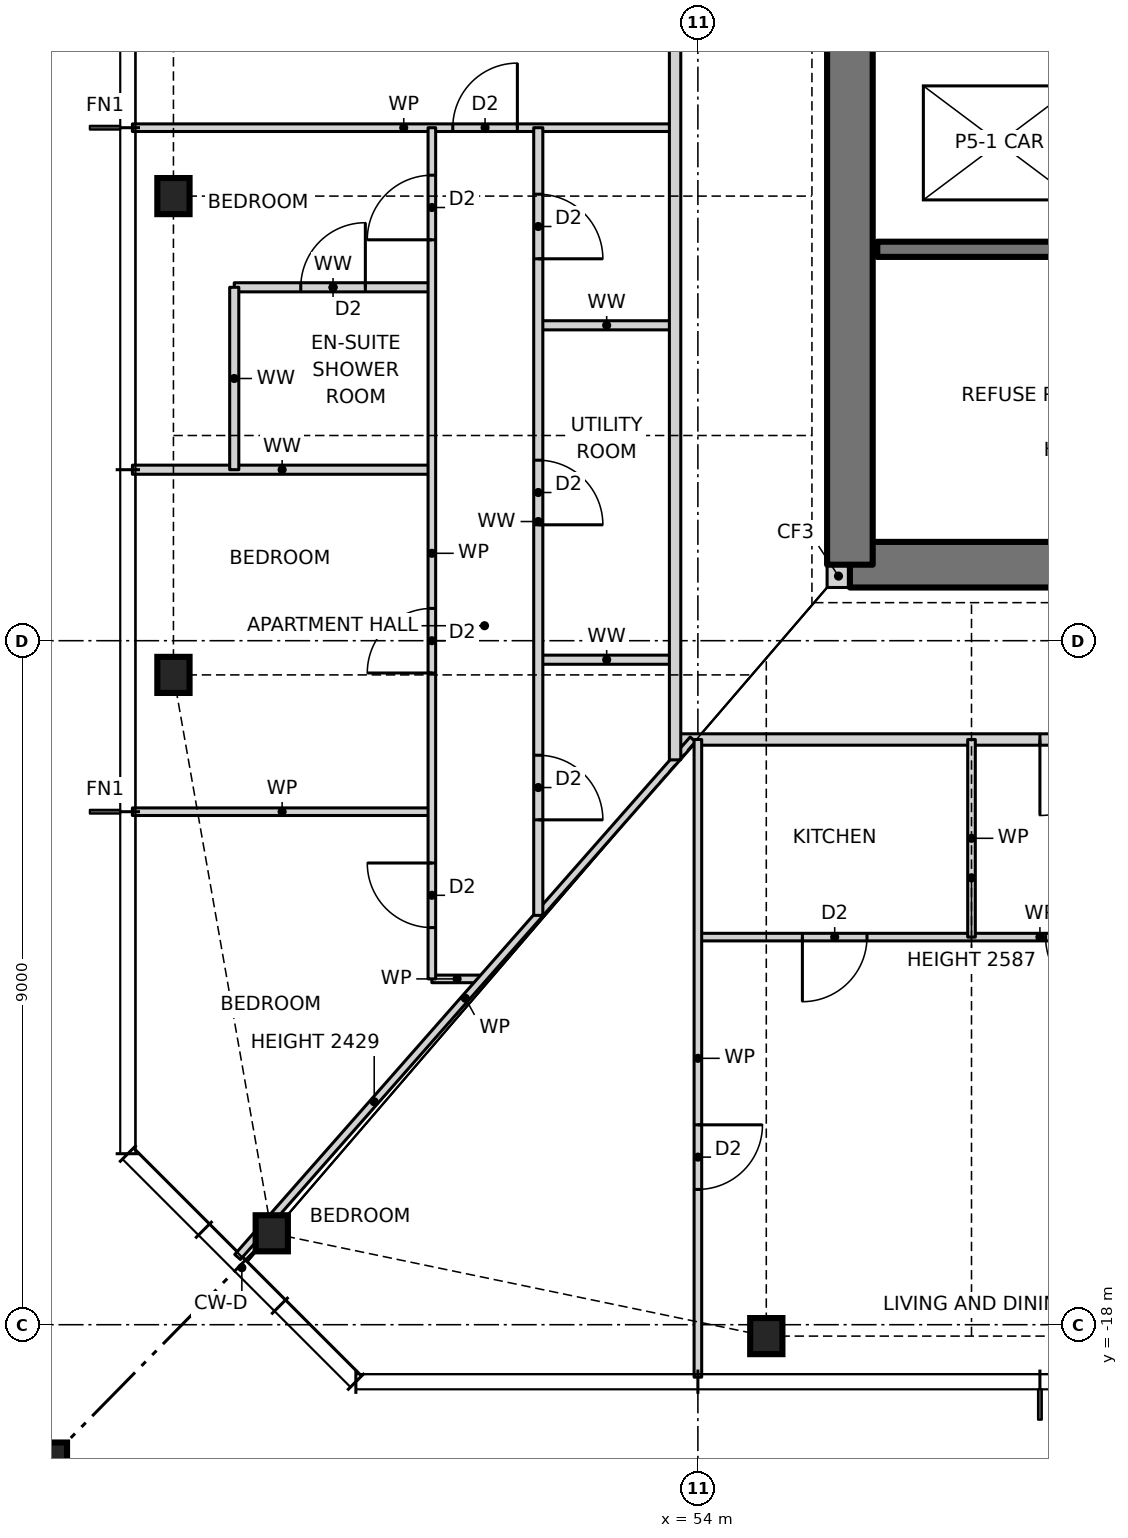
"""IFC4 building model, lengths in metres.
Left out: names, types, materials, properties, quantities, classifications, styles, units other than length and angle.
Written with IfcOpenShell. Run it as: python <this file> out.ifc"""

import sys

from ifc_helpers import new_model, si_unit, direction, frame, frame_2d, origin, origin_2d, place, context, subcontext, project, spatial, rectangle, hollow_rectangle, i_section, extrude, element, fill, save


model = new_model("IFC4")
c1 = context("Model", 3, precision=1e-05, world=origin(), true_north=direction((0.0, 1.0)))
c2 = subcontext(c1, "Body", "Model", "MODEL_VIEW")
j1 = project(units=[si_unit("LENGTHUNIT", "METRE"), si_unit("PLANEANGLEUNIT", "RADIAN")], contexts=[c1])
p1 = place(None, origin())
s1 = spatial("IfcSite", under=j1, at=p1, CompositionType="ELEMENT")
p2 = place(p1, origin())
s2 = spatial("IfcBuilding", under=s1, at=p2, CompositionType="ELEMENT")
p3 = place(p2, frame((0.0, 0.0, 67.5)))
s3 = spatial("IfcBuildingStorey", under=s2, at=p3, CompositionType="ELEMENT", Elevation=67.5)
for number, where, z_axis, x_axis in (
    (1, (48.394, -16.797, 0.0), (0.0, 0.0, 1.0), (1.0, 0.0, 0.0)),
    (2, (54.9, -18.15, 0.0), (0.0, 0.0, 1.0), (1.0, 0.0, 0.0)),
    (3, (47.1, -3.15, 0.0), (0.0, 0.0, 1.0), (1.0, 0.0, 0.0)),
    (4, (47.1, -9.45, 0.0), (0.0, 0.0, 1.0), (1.0, 0.0, 0.0)),
):
    element("IfcColumn", number, at=place(p3, frame(where, z_axis=z_axis, x_axis=x_axis)), inside=s3, PredefinedType="COLUMN", context=c2, shape_type="SweptSolid", body=[
        extrude(i_section(OverallWidth=0.424, OverallDepth=0.475, WebThickness=0.048, FlangeThickness=0.077, at=origin_2d()), origin(), (0.0, 0.0, 1.0), 3.5),
    ])
p4 = place(p3, frame((45.1, -20.15, 0.0), z_axis=(0.0, 0.0, 1.0), x_axis=(1.0, 0.0, 0.0)))
e5 = element("IfcColumn", 5, at=p4, inside=s3, PredefinedType="COLUMN", context=c2, shape_type="SweptSolid", body=[
    extrude(hollow_rectangle(XDim=1.2, YDim=1.2, WallThickness=0.07, at=origin_2d()), origin(), (0.0, 0.0, 1.0), 3.5),
])
p5 = place(p3, frame((55.7, -8.15, 0.0), z_axis=(0.0, 0.0, 1.0), x_axis=(1.0, 0.0, 0.0)))
e6 = element("IfcWall", 6, at=p5, inside=s3, PredefinedType="SOLIDWALL", context=c2, shape_type="SweptSolid", body=[
    extrude(rectangle(XDim=0.3, YDim=0.3, at=frame_2d((0.15, 0.0))), origin(), (0.0, 0.0, 1.0), 3.5),
])
p6 = place(p3, frame((56.0, -8.0, 0.0), z_axis=(0.0, 0.0, 1.0), x_axis=(1.0, 0.0, 0.0)))
e7 = element("IfcWall", 7, at=p6, inside=s3, PredefinedType="SHEAR", context=c2, shape_type="SweptSolid", body=[
    extrude(rectangle(XDim=14.0, YDim=0.6, at=frame_2d((7.0, 0.0))), origin(), (0.0, 0.0, 1.0), 3.5),
])
p7 = place(p6, frame((2.7, 0.0, 0.0)))
e8 = element("IfcOpeningElement", 8, at=p7, cuts=e7, PredefinedType="OPENING", context=c2, shape_type="SweptSolid", body=[
    extrude(rectangle(XDim=0.9, YDim=2.1, at=frame_2d((0.45, 1.05))), frame((0.0, 0.31, 0.0), z_axis=(0.0, -1.0, 0.0), x_axis=(1.0, 0.0, 0.0)), (0.0, 0.0, 1.0), 0.62),
])
p8 = place(p6, frame((7.7, 0.0, 0.0)))
e9 = element("IfcOpeningElement", 9, at=p8, cuts=e7, PredefinedType="OPENING", context=c2, shape_type="SweptSolid", body=[
    extrude(rectangle(XDim=0.9, YDim=2.1, at=frame_2d((0.45, 1.05))), frame((0.0, 0.31, 0.0), z_axis=(0.0, -1.0, 0.0), x_axis=(1.0, 0.0, 0.0)), (0.0, 0.0, 1.0), 0.62),
])
p9 = place(p3, frame((56.0, 8.0, 0.0), z_axis=(0.0, 0.0, 1.0), x_axis=(0.0, -1.0, 0.0)))
e10 = element("IfcWall", 10, at=p9, inside=s3, PredefinedType="SHEAR", context=c2, shape_type="SweptSolid", body=[
    extrude(rectangle(XDim=16.0, YDim=0.6, at=frame_2d((8.0, 0.0))), origin(), (0.0, 0.0, 1.0), 3.5),
])
p10 = place(p9, frame((7.5, 0.0, 0.0)))
e11 = element("IfcOpeningElement", 11, at=p10, cuts=e10, PredefinedType="OPENING", context=c2, shape_type="SweptSolid", body=[
    extrude(rectangle(XDim=1.0, YDim=2.1, at=frame_2d((0.5, 1.05))), frame((0.0, 0.31, 0.0), z_axis=(0.0, -1.0, 0.0), x_axis=(1.0, 0.0, 0.0)), (0.0, 0.0, 1.0), 0.62),
])
p11 = place(p3, frame((50.5, -13.45, 0.0), z_axis=(0.0, 0.0, 1.0), x_axis=(1.0, 0.0, 0.0)))
e12 = element("IfcWall", 12, at=p11, inside=s3, PredefinedType="PARTITIONING", context=c2, shape_type="SweptSolid", body=[
    extrude(rectangle(XDim=0.664, YDim=0.1, at=frame_2d((0.332, 0.0))), origin(), (0.0, 0.0, 1.0), 3.27),
])
p12 = place(p3, frame((54.0, -12.9, 0.0), z_axis=(0.0, 0.0, 1.0), x_axis=(1.0, 0.0, 0.0)))
e13 = element("IfcWall", 13, at=p12, inside=s3, PredefinedType="PARTITIONING", context=c2, shape_type="SweptSolid", body=[
    extrude(rectangle(XDim=9.0, YDim=0.1, at=frame_2d((4.5, 0.0))), origin(), (0.0, 0.0, 1.0), 3.27),
])
p13 = place(p12, frame((1.375, 0.0, 0.0)))
e14 = element("IfcOpeningElement", 14, at=p13, cuts=e13, PredefinedType="OPENING", context=c2, shape_type="SweptSolid", body=[
    extrude(rectangle(XDim=0.85, YDim=2.1, at=frame_2d((0.425, 1.05))), frame((0.0, 0.06, 0.0), z_axis=(0.0, -1.0, 0.0), x_axis=(1.0, 0.0, 0.0)), (0.0, 0.0, 1.0), 0.12),
])
p14 = place(p12, frame((4.575, 0.0, 0.0)))
e15 = element("IfcOpeningElement", 15, at=p14, cuts=e13, PredefinedType="OPENING", context=c2, shape_type="SweptSolid", body=[
    extrude(rectangle(XDim=0.85, YDim=2.1, at=frame_2d((0.425, 1.05))), frame((0.0, 0.06, 0.0), z_axis=(0.0, -1.0, 0.0), x_axis=(1.0, 0.0, 0.0)), (0.0, 0.0, 1.0), 0.12),
])
p15 = place(p3, frame((46.56, -11.25, 0.0), z_axis=(0.0, 0.0, 1.0), x_axis=(1.0, 0.0, 0.0)))
e16 = element("IfcWall", 16, at=p15, inside=s3, PredefinedType="PARTITIONING", context=c2, shape_type="SweptSolid", body=[
    extrude(rectangle(XDim=3.94, YDim=0.1, at=frame_2d((1.97, 0.0))), origin(), (0.0, 0.0, 1.0), 3.27),
])
p16 = place(p3, frame((53.7, -10.3, 0.0), z_axis=(0.0, 0.0, 1.0), x_axis=(1.0, 0.0, 0.0)))
e17 = element("IfcWall", 17, at=p16, inside=s3, PredefinedType="PARTITIONING", context=c2, shape_type="SweptSolid", body=[
    extrude(rectangle(XDim=18.6, YDim=0.15, at=frame_2d((9.3, 0.0))), origin(), (0.0, 0.0, 1.0), 3.27),
])
p17 = place(p16, frame((4.8, 0.0, 0.0)))
e18 = element("IfcOpeningElement", 18, at=p17, cuts=e17, PredefinedType="OPENING", context=c2, shape_type="SweptSolid", body=[
    extrude(rectangle(XDim=1.0, YDim=2.1, at=frame_2d((0.5, 1.05))), frame((0.0, 0.085, 0.0), z_axis=(0.0, -1.0, 0.0), x_axis=(1.0, 0.0, 0.0)), (0.0, 0.0, 1.0), 0.17),
])
p18 = place(p16, frame((10.2, 0.0, 0.0)))
e19 = element("IfcOpeningElement", 19, at=p18, cuts=e17, PredefinedType="OPENING", context=c2, shape_type="SweptSolid", body=[
    extrude(rectangle(XDim=1.0, YDim=2.1, at=frame_2d((0.5, 1.05))), frame((0.0, 0.085, 0.0), z_axis=(0.0, -1.0, 0.0), x_axis=(1.0, 0.0, 0.0)), (0.0, 0.0, 1.0), 0.17),
])
p19 = place(p3, frame((51.9, -9.25, 0.0), z_axis=(0.0, 0.0, 1.0), x_axis=(1.0, 0.0, 0.0)))
e20 = element("IfcWall", 20, at=p19, inside=s3, PredefinedType="PARTITIONING", context=c2, shape_type="SweptSolid", body=[
    extrude(rectangle(XDim=1.8, YDim=0.12, at=frame_2d((0.9, 0.0))), origin(), (0.0, 0.0, 1.0), 3.27),
])
p20 = place(p3, frame((46.56, -6.75, 0.0), z_axis=(0.0, 0.0, 1.0), x_axis=(1.0, 0.0, 0.0)))
e21 = element("IfcWall", 21, at=p20, inside=s3, PredefinedType="PARTITIONING", context=c2, shape_type="SweptSolid", body=[
    extrude(rectangle(XDim=3.94, YDim=0.12, at=frame_2d((1.97, 0.0))), origin(), (0.0, 0.0, 1.0), 3.27),
])
p21 = place(p3, frame((51.9, -4.85, 0.0), z_axis=(0.0, 0.0, 1.0), x_axis=(1.0, 0.0, 0.0)))
e22 = element("IfcWall", 22, at=p21, inside=s3, PredefinedType="PARTITIONING", context=c2, shape_type="SweptSolid", body=[
    extrude(rectangle(XDim=1.8, YDim=0.12, at=frame_2d((0.9, 0.0))), origin(), (0.0, 0.0, 1.0), 3.27),
])
p22 = place(p3, frame((47.9, -4.35, 0.0), z_axis=(0.0, 0.0, 1.0), x_axis=(1.0, 0.0, 0.0)))
e23 = element("IfcWall", 23, at=p22, inside=s3, PredefinedType="PARTITIONING", context=c2, shape_type="SweptSolid", body=[
    extrude(rectangle(XDim=2.6, YDim=0.12, at=frame_2d((1.3, 0.0))), origin(), (0.0, 0.0, 1.0), 3.27),
])
p23 = place(p22, frame((0.875, 0.0, 0.0)))
e24 = element("IfcOpeningElement", 24, at=p23, cuts=e23, PredefinedType="OPENING", context=c2, shape_type="SweptSolid", body=[
    extrude(rectangle(XDim=0.85, YDim=2.1, at=frame_2d((0.425, 1.05))), frame((0.0, 0.07, 0.0), z_axis=(0.0, -1.0, 0.0), x_axis=(1.0, 0.0, 0.0)), (0.0, 0.0, 1.0), 0.14),
])
p24 = place(p3, frame((56.36, -3.85, 0.0), z_axis=(0.0, 0.0, 1.0), x_axis=(1.0, 0.0, 0.0)))
e25 = element("IfcWall", 25, at=p24, inside=s3, PredefinedType="SOLIDWALL", context=c2, shape_type="SweptSolid", body=[
    extrude(rectangle(XDim=9.94, YDim=0.2, at=frame_2d((4.97, 0.0))), origin(), (0.0, 0.0, 1.0), 3.5),
])
p25 = place(p3, frame((46.56, -2.25, 0.0), z_axis=(0.0, 0.0, 1.0), x_axis=(1.0, 0.0, 0.0)))
e26 = element("IfcWall", 26, at=p25, inside=s3, PredefinedType="PARTITIONING", context=c2, shape_type="SweptSolid", body=[
    extrude(rectangle(XDim=7.14, YDim=0.1, at=frame_2d((3.57, 0.0))), origin(), (0.0, 0.0, 1.0), 3.27),
])
p26 = place(p25, frame((4.215, 0.0, 0.0)))
e27 = element("IfcOpeningElement", 27, at=p26, cuts=e26, PredefinedType="OPENING", context=c2, shape_type="SweptSolid", body=[
    extrude(rectangle(XDim=0.85, YDim=2.1, at=frame_2d((0.425, 1.05))), frame((0.0, 0.06, 0.0), z_axis=(0.0, -1.0, 0.0), x_axis=(1.0, 0.0, 0.0)), (0.0, 0.0, 1.0), 0.12),
])
p27 = place(p3, frame((47.944, -17.109, 0.0), z_axis=(0.0, 0.0, 1.0), x_axis=(0.660638210404, 0.750704439146, 0.0)))
e28 = element("IfcWall", 28, at=p27, inside=s3, PredefinedType="PARTITIONING", context=c2, shape_type="SweptSolid", body=[
    extrude(rectangle(XDim=9.07, YDim=0.1, at=frame_2d((4.535, 0.0))), origin(), (0.0, 0.0, 1.0), 2.429),
])
p28 = place(p3, frame((57.6, -12.9, 0.0), z_axis=(0.0, 0.0, 1.0), x_axis=(0.0, 1.0, 0.0)))
e29 = element("IfcWall", 29, at=p28, inside=s3, PredefinedType="PARTITIONING", context=c2, shape_type="SweptSolid", body=[
    extrude(rectangle(XDim=2.6, YDim=0.1, at=frame_2d((1.3, 0.0))), origin(), (0.0, 0.0, 1.0), 2.587),
])
p29 = place(p3, frame((54.0, -18.69, 0.0), z_axis=(0.0, 0.0, 1.0), x_axis=(0.0, 1.0, 0.0)))
e30 = element("IfcWall", 30, at=p29, inside=s3, PredefinedType="PARTITIONING", context=c2, shape_type="SweptSolid", body=[
    extrude(rectangle(XDim=8.39, YDim=0.1, at=frame_2d((4.195, 0.0))), origin(), (0.0, 0.0, 1.0), 3.27),
])
p30 = place(p29, frame((2.47, 0.0, 0.0)))
e31 = element("IfcOpeningElement", 31, at=p30, cuts=e30, PredefinedType="OPENING", context=c2, shape_type="SweptSolid", body=[
    extrude(rectangle(XDim=0.85, YDim=2.1, at=frame_2d((0.425, 1.05))), frame((0.0, 0.06, 0.0), z_axis=(0.0, -1.0, 0.0), x_axis=(1.0, 0.0, 0.0)), (0.0, 0.0, 1.0), 0.12),
])
p31 = place(p3, frame((53.7, -10.568, 0.0), z_axis=(0.0, 0.0, 1.0), x_axis=(0.0, 1.0, 0.0)))
e32 = element("IfcWall", 32, at=p31, inside=s3, PredefinedType="PARTITIONING", context=c2, shape_type="SweptSolid", body=[
    extrude(rectangle(XDim=21.136, YDim=0.15, at=frame_2d((10.568, 0.0))), origin(), (0.0, 0.0, 1.0), 3.27),
])
p32 = place(p31, frame((16.318, 0.0, 0.0)))
e33 = element("IfcOpeningElement", 33, at=p32, cuts=e32, PredefinedType="OPENING", context=c2, shape_type="SweptSolid", body=[
    extrude(rectangle(XDim=1.0, YDim=2.1, at=frame_2d((0.5, 1.05))), frame((0.0, 0.085, 0.0), z_axis=(0.0, -1.0, 0.0), x_axis=(1.0, 0.0, 0.0)), (0.0, 0.0, 1.0), 0.17),
])
p33 = place(p31, frame((10.918, 0.0, 0.0)))
e34 = element("IfcOpeningElement", 34, at=p33, cuts=e32, PredefinedType="OPENING", context=c2, shape_type="SweptSolid", body=[
    extrude(rectangle(XDim=1.0, YDim=2.1, at=frame_2d((0.5, 1.05))), frame((0.0, 0.085, 0.0), z_axis=(0.0, -1.0, 0.0), x_axis=(1.0, 0.0, 0.0)), (0.0, 0.0, 1.0), 0.17),
])
p34 = place(p3, frame((51.9, -12.614, 0.0), z_axis=(0.0, 0.0, 1.0), x_axis=(0.0, 1.0, 0.0)))
e35 = element("IfcWall", 35, at=p34, inside=s3, PredefinedType="PARTITIONING", context=c2, shape_type="SweptSolid", body=[
    extrude(rectangle(XDim=10.364, YDim=0.12, at=frame_2d((5.182, 0.0))), origin(), (0.0, 0.0, 1.0), 3.27),
])
p35 = place(p34, frame((8.639, 0.0, 0.0)))
e36 = element("IfcOpeningElement", 36, at=p35, cuts=e35, PredefinedType="OPENING", context=c2, shape_type="SweptSolid", body=[
    extrude(rectangle(XDim=0.85, YDim=2.1, at=frame_2d((0.425, 1.05))), frame((0.0, 0.07, 0.0), z_axis=(0.0, -1.0, 0.0), x_axis=(1.0, 0.0, 0.0)), (0.0, 0.0, 1.0), 0.14),
])
p36 = place(p34, frame((5.139, 0.0, 0.0)))
e37 = element("IfcOpeningElement", 37, at=p36, cuts=e35, PredefinedType="OPENING", context=c2, shape_type="SweptSolid", body=[
    extrude(rectangle(XDim=0.85, YDim=2.1, at=frame_2d((0.425, 1.05))), frame((0.0, 0.07, 0.0), z_axis=(0.0, -1.0, 0.0), x_axis=(1.0, 0.0, 0.0)), (0.0, 0.0, 1.0), 0.14),
])
p37 = place(p34, frame((1.257, 0.0, 0.0)))
e38 = element("IfcOpeningElement", 38, at=p37, cuts=e35, PredefinedType="OPENING", context=c2, shape_type="SweptSolid", body=[
    extrude(rectangle(XDim=0.85, YDim=2.1, at=frame_2d((0.425, 1.05))), frame((0.0, 0.07, 0.0), z_axis=(0.0, -1.0, 0.0), x_axis=(1.0, 0.0, 0.0)), (0.0, 0.0, 1.0), 0.14),
])
p38 = place(p3, frame((50.5, -13.45, 0.0), z_axis=(0.0, 0.0, 1.0), x_axis=(0.0, 1.0, 0.0)))
e39 = element("IfcWall", 39, at=p38, inside=s3, PredefinedType="PARTITIONING", context=c2, shape_type="SweptSolid", body=[
    extrude(rectangle(XDim=11.2, YDim=0.1, at=frame_2d((5.6, 0.0))), origin(), (0.0, 0.0, 1.0), 3.27),
])
p39 = place(p38, frame((9.725, 0.0, 0.0)))
e40 = element("IfcOpeningElement", 40, at=p39, cuts=e39, PredefinedType="OPENING", context=c2, shape_type="SweptSolid", body=[
    extrude(rectangle(XDim=0.85, YDim=2.1, at=frame_2d((0.425, 1.05))), frame((0.0, 0.06, 0.0), z_axis=(0.0, -1.0, 0.0), x_axis=(1.0, 0.0, 0.0)), (0.0, 0.0, 1.0), 0.12),
])
p40 = place(p38, frame((4.025, 0.0, 0.0)))
e41 = element("IfcOpeningElement", 41, at=p40, cuts=e39, PredefinedType="OPENING", context=c2, shape_type="SweptSolid", body=[
    extrude(rectangle(XDim=0.85, YDim=2.1, at=frame_2d((0.425, 1.05))), frame((0.0, 0.06, 0.0), z_axis=(0.0, -1.0, 0.0), x_axis=(1.0, 0.0, 0.0)), (0.0, 0.0, 1.0), 0.12),
])
p41 = place(p38, frame((0.675, 0.0, 0.0)))
e42 = element("IfcOpeningElement", 42, at=p41, cuts=e39, PredefinedType="OPENING", context=c2, shape_type="SweptSolid", body=[
    extrude(rectangle(XDim=0.85, YDim=2.1, at=frame_2d((0.425, 1.05))), frame((0.0, 0.06, 0.0), z_axis=(0.0, -1.0, 0.0), x_axis=(1.0, 0.0, 0.0)), (0.0, 0.0, 1.0), 0.12),
])
p42 = place(p3, frame((47.9, -6.75, 0.0), z_axis=(0.0, 0.0, 1.0), x_axis=(0.0, 1.0, 0.0)))
e43 = element("IfcWall", 43, at=p42, inside=s3, PredefinedType="PARTITIONING", context=c2, shape_type="SweptSolid", body=[
    extrude(rectangle(XDim=2.4, YDim=0.12, at=frame_2d((1.2, 0.0))), origin(), (0.0, 0.0, 1.0), 3.27),
])
p43 = place(p13, frame((0.85, 0.0, 0.0), z_axis=(0.0, 0.0, 1.0), x_axis=(-1.0, 0.0, 0.0)))
e44 = element("IfcDoor", 44, at=p43, inside=s3, OperationType="SINGLE_SWING_RIGHT", PredefinedType="DOOR", context=c2, shape_type="SweptSolid", body=[
    extrude(rectangle(XDim=0.85, YDim=2.1, at=frame_2d((0.425, 1.05))), frame((0.0, 0.025, 0.0), z_axis=(0.0, -1.0, 0.0), x_axis=(1.0, 0.0, 0.0)), (0.0, 0.0, 1.0), 0.05),
])
fill(e14, e44)
p44 = place(p17, frame((1.0, 0.0, 0.0), z_axis=(0.0, 0.0, 1.0), x_axis=(-1.0, 0.0, 0.0)))
e45 = element("IfcDoor", 45, at=p44, inside=s3, OperationType="SINGLE_SWING_RIGHT", PredefinedType="DOOR", context=c2, shape_type="SweptSolid", body=[
    extrude(rectangle(XDim=1.0, YDim=2.1, at=frame_2d((0.5, 1.05))), frame((0.0, 0.025, 0.0), z_axis=(0.0, -1.0, 0.0), x_axis=(1.0, 0.0, 0.0)), (0.0, 0.0, 1.0), 0.05),
])
fill(e18, e45)
p45 = place(p14, frame((0.85, 0.0, 0.0), z_axis=(0.0, 0.0, 1.0), x_axis=(-1.0, 0.0, 0.0)))
e46 = element("IfcDoor", 46, at=p45, inside=s3, OperationType="SINGLE_SWING_LEFT", PredefinedType="DOOR", context=c2, shape_type="SweptSolid", body=[
    extrude(rectangle(XDim=0.85, YDim=2.1, at=frame_2d((0.425, 1.05))), frame((0.0, 0.025, 0.0), z_axis=(0.0, -1.0, 0.0), x_axis=(1.0, 0.0, 0.0)), (0.0, 0.0, 1.0), 0.05),
])
fill(e15, e46)
p46 = place(p30, frame((0.85, 0.0, 0.0), z_axis=(0.0, 0.0, 1.0), x_axis=(-1.0, 0.0, 0.0)))
e47 = element("IfcDoor", 47, at=p46, inside=s3, OperationType="SINGLE_SWING_LEFT", PredefinedType="DOOR", context=c2, shape_type="SweptSolid", body=[
    extrude(rectangle(XDim=0.85, YDim=2.1, at=frame_2d((0.425, 1.05))), frame((0.0, 0.025, 0.0), z_axis=(0.0, -1.0, 0.0), x_axis=(1.0, 0.0, 0.0)), (0.0, 0.0, 1.0), 0.05),
])
fill(e31, e47)
p47 = place(p26, origin())
e48 = element("IfcDoor", 48, at=p47, inside=s3, OperationType="SINGLE_SWING_RIGHT", PredefinedType="DOOR", context=c2, shape_type="SweptSolid", body=[
    extrude(rectangle(XDim=0.85, YDim=2.1, at=frame_2d((0.425, 1.05))), frame((0.0, 0.025, 0.0), z_axis=(0.0, -1.0, 0.0), x_axis=(1.0, 0.0, 0.0)), (0.0, 0.0, 1.0), 0.05),
])
fill(e27, e48)
p48 = place(p23, origin())
e49 = element("IfcDoor", 49, at=p48, inside=s3, OperationType="SINGLE_SWING_RIGHT", PredefinedType="DOOR", context=c2, shape_type="SweptSolid", body=[
    extrude(rectangle(XDim=0.85, YDim=2.1, at=frame_2d((0.425, 1.05))), frame((0.0, 0.025, 0.0), z_axis=(0.0, -1.0, 0.0), x_axis=(1.0, 0.0, 0.0)), (0.0, 0.0, 1.0), 0.05),
])
fill(e24, e49)
p49 = place(p39, origin())
e50 = element("IfcDoor", 50, at=p49, inside=s3, OperationType="SINGLE_SWING_LEFT", PredefinedType="DOOR", context=c2, shape_type="SweptSolid", body=[
    extrude(rectangle(XDim=0.85, YDim=2.1, at=frame_2d((0.425, 1.05))), frame((0.0, 0.025, 0.0), z_axis=(0.0, -1.0, 0.0), x_axis=(1.0, 0.0, 0.0)), (0.0, 0.0, 1.0), 0.05),
])
fill(e40, e50)
p50 = place(p40, origin())
e51 = element("IfcDoor", 51, at=p50, inside=s3, OperationType="SINGLE_SWING_LEFT", PredefinedType="DOOR", context=c2, shape_type="SweptSolid", body=[
    extrude(rectangle(XDim=0.85, YDim=2.1, at=frame_2d((0.425, 1.05))), frame((0.0, 0.025, 0.0), z_axis=(0.0, -1.0, 0.0), x_axis=(1.0, 0.0, 0.0)), (0.0, 0.0, 1.0), 0.05),
])
fill(e41, e51)
p51 = place(p41, origin())
e52 = element("IfcDoor", 52, at=p51, inside=s3, OperationType="SINGLE_SWING_RIGHT", PredefinedType="DOOR", context=c2, shape_type="SweptSolid", body=[
    extrude(rectangle(XDim=0.85, YDim=2.1, at=frame_2d((0.425, 1.05))), frame((0.0, 0.025, 0.0), z_axis=(0.0, -1.0, 0.0), x_axis=(1.0, 0.0, 0.0)), (0.0, 0.0, 1.0), 0.05),
])
fill(e42, e52)
p52 = place(p35, frame((0.85, 0.0, 0.0), z_axis=(0.0, 0.0, 1.0), x_axis=(-1.0, 0.0, 0.0)))
e53 = element("IfcDoor", 53, at=p52, inside=s3, OperationType="SINGLE_SWING_RIGHT", PredefinedType="DOOR", context=c2, shape_type="SweptSolid", body=[
    extrude(rectangle(XDim=0.85, YDim=2.1, at=frame_2d((0.425, 1.05))), frame((0.0, 0.025, 0.0), z_axis=(0.0, -1.0, 0.0), x_axis=(1.0, 0.0, 0.0)), (0.0, 0.0, 1.0), 0.05),
])
fill(e36, e53)
p53 = place(p36, frame((0.85, 0.0, 0.0), z_axis=(0.0, 0.0, 1.0), x_axis=(-1.0, 0.0, 0.0)))
e54 = element("IfcDoor", 54, at=p53, inside=s3, OperationType="SINGLE_SWING_RIGHT", PredefinedType="DOOR", context=c2, shape_type="SweptSolid", body=[
    extrude(rectangle(XDim=0.85, YDim=2.1, at=frame_2d((0.425, 1.05))), frame((0.0, 0.025, 0.0), z_axis=(0.0, -1.0, 0.0), x_axis=(1.0, 0.0, 0.0)), (0.0, 0.0, 1.0), 0.05),
])
fill(e37, e54)
p54 = place(p37, frame((0.85, 0.0, 0.0), z_axis=(0.0, 0.0, 1.0), x_axis=(-1.0, 0.0, 0.0)))
e55 = element("IfcDoor", 55, at=p54, inside=s3, OperationType="SINGLE_SWING_RIGHT", PredefinedType="DOOR", context=c2, shape_type="SweptSolid", body=[
    extrude(rectangle(XDim=0.85, YDim=2.1, at=frame_2d((0.425, 1.05))), frame((0.0, 0.025, 0.0), z_axis=(0.0, -1.0, 0.0), x_axis=(1.0, 0.0, 0.0)), (0.0, 0.0, 1.0), 0.05),
])
fill(e38, e55)
save(model, sys.argv[1])
